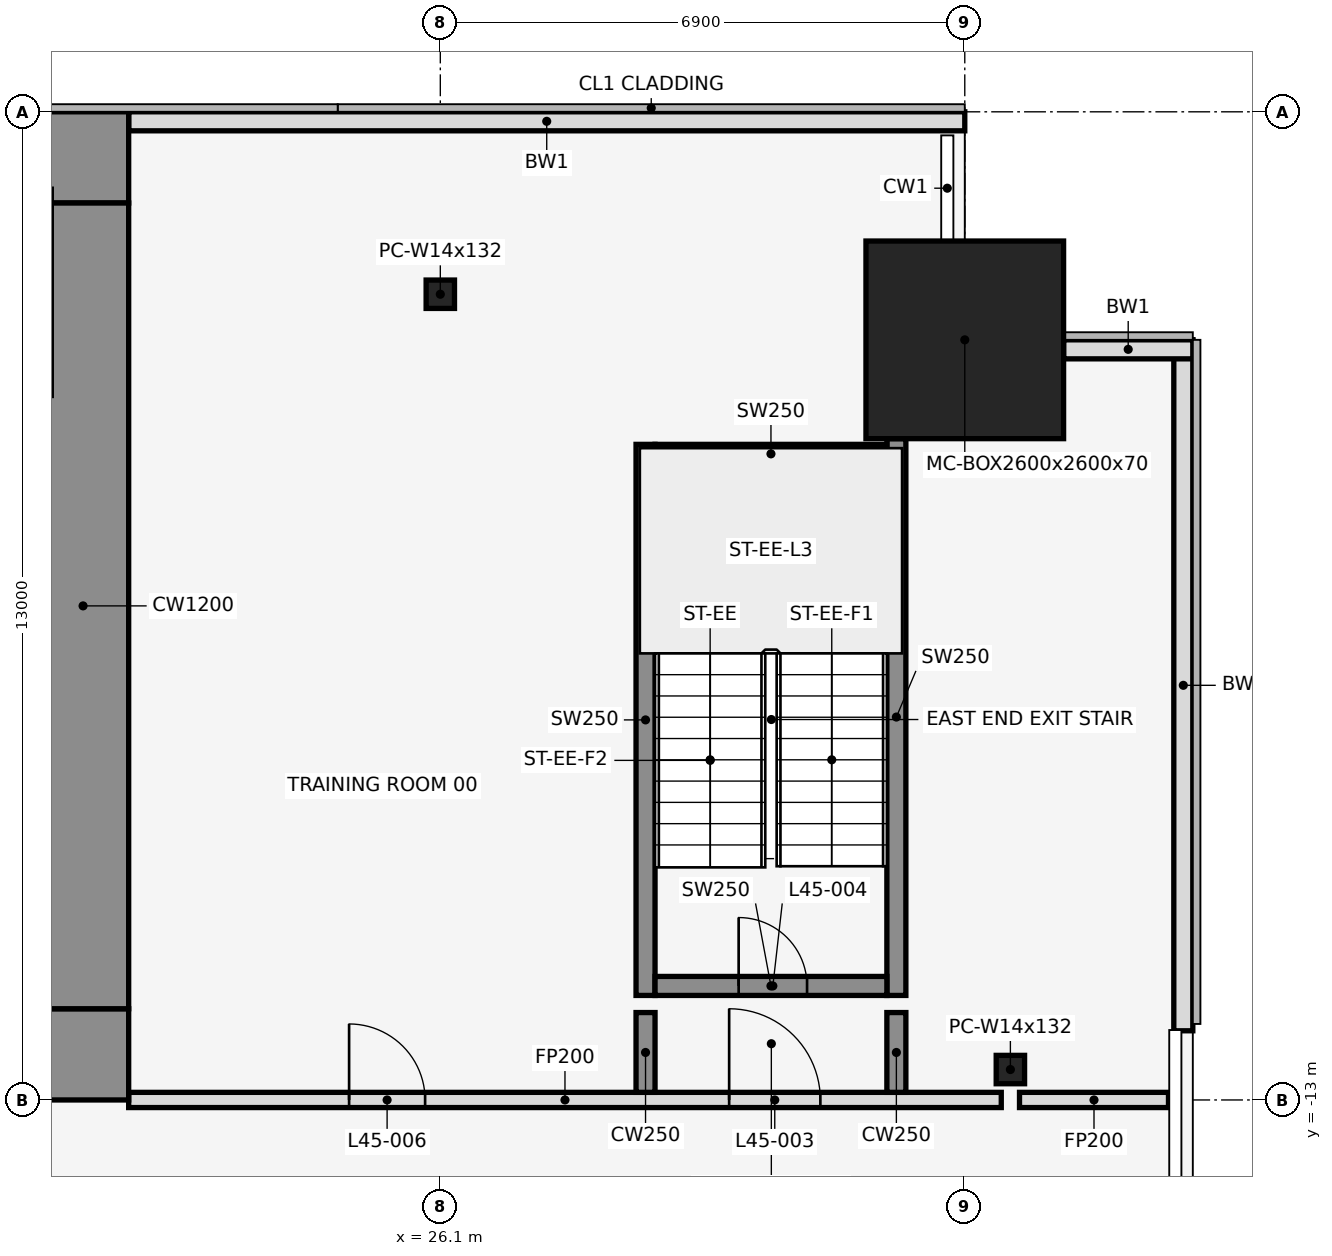
"""IFC4 building model, lengths in metres.
Left out: names, types, materials, properties, quantities, classifications, styles, units other than length and angle.
Written with IfcOpenShell. Run it as: python <this file> out.ifc"""

import sys

from ifc_helpers import new_model, si_unit, direction, frame, frame_2d, origin, origin_2d, place, context, subcontext, project, spatial, rectangle, hollow_rectangle, i_section, extrude, element, fill, save


model = new_model("IFC4")
c1 = context("Model", 3, precision=1e-05, world=origin(), true_north=direction((0.0, 1.0)))
c2 = subcontext(c1, "Body", "Model", "MODEL_VIEW")
j1 = project(units=[si_unit("LENGTHUNIT", "METRE"), si_unit("PLANEANGLEUNIT", "RADIAN")], contexts=[c1])
p1 = place(None, origin())
s1 = spatial("IfcSite", under=j1, at=p1, CompositionType="ELEMENT")
p2 = place(p1, origin())
s2 = spatial("IfcBuilding", under=s1, at=p2, CompositionType="ELEMENT")
p3 = place(p2, frame((0.0, 0.0, 203.2)))
s3 = spatial("IfcBuildingStorey", under=s2, at=p3, CompositionType="ELEMENT", Elevation=203.2)
p4 = place(p3, frame((26.1, -2.4, 0.0), z_axis=(0.0, 0.0, 1.0), x_axis=(1.0, 0.0, 0.0)))
e1 = element("IfcColumn", 1, at=p4, inside=s3, PredefinedType="COLUMN", context=c2, shape_type="SweptSolid", body=[
    extrude(i_section(OverallWidth=0.373, OverallDepth=0.373, WebThickness=0.016, FlangeThickness=0.026, at=origin_2d()), origin(), (0.0, 0.0, 1.0), 4.1),
])
p5 = place(p3, frame((33.0, -3.0, 0.0), z_axis=(0.0, 0.0, 1.0), x_axis=(1.0, 0.0, 0.0)))
e2 = element("IfcColumn", 2, at=p5, inside=s3, PredefinedType="COLUMN", context=c2, shape_type="SweptSolid", body=[
    extrude(hollow_rectangle(XDim=2.6, YDim=2.6, WallThickness=0.07, at=origin_2d()), origin(), (0.0, 0.0, 1.0), 4.1),
])
p6 = place(p3, frame((33.6, -12.6, 0.0), z_axis=(0.0, 0.0, 1.0), x_axis=(1.0, 0.0, 0.0)))
e3 = element("IfcColumn", 3, at=p6, inside=s3, PredefinedType="COLUMN", context=c2, shape_type="SweptSolid", body=[
    extrude(i_section(OverallWidth=0.373, OverallDepth=0.373, WebThickness=0.016, FlangeThickness=0.026, at=origin_2d()), origin(), (0.0, 0.0, 1.0), 4.1),
])
p7 = place(p3, frame((33.0, -0.125, 0.0), z_axis=(0.0, 0.0, 1.0), x_axis=(-1.0, 0.0, 0.0)))
e4 = element("IfcWall", 4, at=p7, inside=s3, PredefinedType="STANDARD", context=c2, shape_type="SweptSolid", body=[
    extrude(rectangle(XDim=11.0, YDim=0.25, at=frame_2d((5.5, 0.0))), origin(), (0.0, 0.0, 1.0), 3.95),
])
p8 = place(p3, frame((35.875, -12.09, 0.0), z_axis=(0.0, 0.0, 1.0), x_axis=(0.0, 1.0, 0.0)))
e5 = element("IfcWall", 5, at=p8, inside=s3, PredefinedType="STANDARD", context=c2, shape_type="SweptSolid", body=[
    extrude(rectangle(XDim=9.09, YDim=0.25, at=frame_2d((4.545, 0.0))), origin(), (0.0, 0.0, 1.0), 3.95),
])
p9 = place(p3, frame((36.0, -3.125, 0.0), z_axis=(0.0, 0.0, 1.0), x_axis=(-1.0, 0.0, 0.0)))
e6 = element("IfcWall", 6, at=p9, inside=s3, PredefinedType="STANDARD", context=c2, shape_type="SweptSolid", body=[
    extrude(rectangle(XDim=1.7, YDim=0.25, at=frame_2d((0.85, 0.0))), origin(), (0.0, 0.0, 1.0), 3.95),
])
p10 = place(p3, frame((28.8, -11.625, 0.0), z_axis=(0.0, 0.0, 1.0), x_axis=(0.0, 1.0, 0.0)))
e7 = element("IfcWall", 7, at=p10, inside=s3, PredefinedType="SHEAR", context=c2, shape_type="SweptSolid", body=[
    extrude(rectangle(XDim=7.25, YDim=0.25, at=frame_2d((3.625, 0.0))), origin(), (0.0, 0.0, 1.0), 4.1),
])
p11 = place(p3, frame((32.1, -11.625, 0.0), z_axis=(0.0, 0.0, 1.0), x_axis=(0.0, 1.0, 0.0)))
e8 = element("IfcWall", 8, at=p11, inside=s3, PredefinedType="SHEAR", context=c2, shape_type="SweptSolid", body=[
    extrude(rectangle(XDim=7.325, YDim=0.25, at=frame_2d((3.663, 0.0))), origin(), (0.0, 0.0, 1.0), 4.1),
])
p12 = place(p3, frame((28.925, -11.5, 0.0), z_axis=(0.0, 0.0, 1.0), x_axis=(1.0, 0.0, 0.0)))
e9 = element("IfcWall", 9, at=p12, inside=s3, PredefinedType="SHEAR", context=c2, shape_type="SweptSolid", body=[
    extrude(rectangle(XDim=3.05, YDim=0.25, at=frame_2d((1.525, 0.0))), origin(), (0.0, 0.0, 1.0), 4.1),
])
p13 = place(p12, frame((1.1, 0.0, 0.0)))
e10 = element("IfcOpeningElement", 10, at=p13, cuts=e9, PredefinedType="OPENING", context=c2, shape_type="SweptSolid", body=[
    extrude(rectangle(XDim=0.9, YDim=2.1, at=frame_2d((0.45, 1.05))), frame((0.0, 0.137, 0.0), z_axis=(0.0, -1.0, 0.0), x_axis=(1.0, 0.0, 0.0)), (0.0, 0.0, 1.0), 0.274),
])
p14 = place(p3, frame((28.925, -4.5, 0.0), z_axis=(0.0, 0.0, 1.0), x_axis=(1.0, 0.0, 0.0)))
e11 = element("IfcWall", 11, at=p14, inside=s3, PredefinedType="SHEAR", context=c2, shape_type="SweptSolid", body=[
    extrude(rectangle(XDim=3.05, YDim=0.25, at=frame_2d((1.525, 0.0))), origin(), (0.0, 0.0, 1.0), 4.1),
])
p15 = place(p3, frame((22.0, -13.0, 0.0), z_axis=(0.0, 0.0, 1.0), x_axis=(1.0, 0.0, 0.0)))
e12 = element("IfcWall", 12, at=p15, inside=s3, PredefinedType="PARTITIONING", context=c2, shape_type="SweptSolid", body=[
    extrude(rectangle(XDim=11.48, YDim=0.2, at=frame_2d((5.74, 0.0))), origin(), (0.0, 0.0, 1.0), 2.84),
])
p16 = place(p15, frame((7.9, 0.0, 0.0)))
e13 = element("IfcOpeningElement", 13, at=p16, cuts=e12, PredefinedType="OPENING", context=c2, shape_type="SweptSolid", body=[
    extrude(rectangle(XDim=1.2, YDim=2.1, at=frame_2d((0.6, 1.05))), frame((0.0, 0.112, 0.0), z_axis=(0.0, -1.0, 0.0), x_axis=(1.0, 0.0, 0.0)), (0.0, 0.0, 1.0), 0.224),
])
p17 = place(p15, frame((2.9, 0.0, 0.0)))
e14 = element("IfcOpeningElement", 14, at=p17, cuts=e12, PredefinedType="OPENING", context=c2, shape_type="SweptSolid", body=[
    extrude(rectangle(XDim=1.0, YDim=2.1, at=frame_2d((0.5, 1.05))), frame((0.0, 0.112, 0.0), z_axis=(0.0, -1.0, 0.0), x_axis=(1.0, 0.0, 0.0)), (0.0, 0.0, 1.0), 0.224),
])
p18 = place(p3, frame((33.72, -13.0, 0.0), z_axis=(0.0, 0.0, 1.0), x_axis=(1.0, 0.0, 0.0)))
e15 = element("IfcWall", 15, at=p18, inside=s3, PredefinedType="PARTITIONING", context=c2, shape_type="SweptSolid", body=[
    extrude(rectangle(XDim=1.96, YDim=0.2, at=frame_2d((0.98, 0.0))), origin(), (0.0, 0.0, 1.0), 2.84),
])
for number, where, z_axis, x_axis in (
    (16, (28.8, -12.9, 0.0), (0.0, 0.0, 1.0), (0.0, 1.0, 0.0)),
    (17, (32.1, -12.9, 0.0), (0.0, 0.0, 1.0), (0.0, 1.0, 0.0)),
):
    element("IfcWall", number, at=place(p3, frame(where, z_axis=z_axis, x_axis=x_axis)), inside=s3, PredefinedType="SHEAR", context=c2, shape_type="SweptSolid", body=[
        extrude(rectangle(XDim=1.05, YDim=0.25, at=frame_2d((0.525, 0.0))), origin(), (0.0, 0.0, 1.0), 4.1),
    ])
p19 = place(p3, frame((-22.0, -0.6, 0.0), z_axis=(0.0, 0.0, 1.0), x_axis=(1.0, 0.0, 0.0)))
e18 = element("IfcWall", 18, at=p19, inside=s3, PredefinedType="SHEAR", context=c2, shape_type="SweptSolid", body=[
    extrude(rectangle(XDim=44.0, YDim=1.2, at=frame_2d((22.0, 0.0))), origin(), (0.0, 0.0, 1.0), 4.1),
])
p20 = place(p19, frame((18.55, 0.0, 0.0)))
e19 = element("IfcOpeningElement", 19, at=p20, cuts=e18, PredefinedType="OPENING", context=c2, shape_type="SweptSolid", body=[
    extrude(rectangle(XDim=0.9, YDim=2.1, at=frame_2d((0.45, 1.05))), frame((0.0, 0.612, 0.0), z_axis=(0.0, -1.0, 0.0), x_axis=(1.0, 0.0, 0.0)), (0.0, 0.0, 1.0), 1.224),
])
p21 = place(p19, frame((24.55, 0.0, 0.0)))
e20 = element("IfcOpeningElement", 20, at=p21, cuts=e18, PredefinedType="OPENING", context=c2, shape_type="SweptSolid", body=[
    extrude(rectangle(XDim=0.9, YDim=2.1, at=frame_2d((0.45, 1.05))), frame((0.0, 0.612, 0.0), z_axis=(0.0, -1.0, 0.0), x_axis=(1.0, 0.0, 0.0)), (0.0, 0.0, 1.0), 1.224),
])
p22 = place(p3, frame((-22.0, -12.4, 0.0), z_axis=(0.0, 0.0, 1.0), x_axis=(1.0, 0.0, 0.0)))
e21 = element("IfcWall", 21, at=p22, inside=s3, PredefinedType="SHEAR", context=c2, shape_type="SweptSolid", body=[
    extrude(rectangle(XDim=44.0, YDim=1.2, at=frame_2d((22.0, 0.0))), origin(), (0.0, 0.0, 1.0), 4.1),
])
p23 = place(p22, frame((2.2, 0.0, 0.0)))
e22 = element("IfcOpeningElement", 22, at=p23, cuts=e21, PredefinedType="OPENING", context=c2, shape_type="SweptSolid", body=[
    extrude(rectangle(XDim=1.2, YDim=2.1, at=frame_2d((0.6, 1.05))), frame((0.0, 0.612, 0.0), z_axis=(0.0, -1.0, 0.0), x_axis=(1.0, 0.0, 0.0)), (0.0, 0.0, 1.0), 1.224),
])
p24 = place(p22, frame((21.4, 0.0, 0.0)))
e23 = element("IfcOpeningElement", 23, at=p24, cuts=e21, PredefinedType="OPENING", context=c2, shape_type="SweptSolid", body=[
    extrude(rectangle(XDim=1.2, YDim=2.1, at=frame_2d((0.6, 1.05))), frame((0.0, 0.612, 0.0), z_axis=(0.0, -1.0, 0.0), x_axis=(1.0, 0.0, 0.0)), (0.0, 0.0, 1.0), 1.224),
])
p25 = place(p22, frame((40.6, 0.0, 0.0)))
e24 = element("IfcOpeningElement", 24, at=p25, cuts=e21, PredefinedType="OPENING", context=c2, shape_type="SweptSolid", body=[
    extrude(rectangle(XDim=1.2, YDim=2.1, at=frame_2d((0.6, 1.05))), frame((0.0, 0.612, 0.0), z_axis=(0.0, -1.0, 0.0), x_axis=(1.0, 0.0, 0.0)), (0.0, 0.0, 1.0), 1.224),
])
p26 = place(p22, frame((16.0, 0.0, 0.0)))
e25 = element("IfcOpeningElement", 25, at=p26, cuts=e21, PredefinedType="OPENING", context=c2, shape_type="SweptSolid", body=[
    extrude(rectangle(XDim=1.8, YDim=2.1, at=frame_2d((0.9, 1.05))), frame((0.0, 0.612, 0.0), z_axis=(0.0, -1.0, 0.0), x_axis=(1.0, 0.0, 0.0)), (0.0, 0.0, 1.0), 1.224),
])
p27 = place(p22, frame((6.3, 0.0, 0.0)))
e26 = element("IfcOpeningElement", 26, at=p27, cuts=e21, PredefinedType="OPENING", context=c2, shape_type="SweptSolid", body=[
    extrude(rectangle(XDim=1.2, YDim=2.1, at=frame_2d((0.6, 1.05))), frame((0.0, 0.612, 0.0), z_axis=(0.0, -1.0, 0.0), x_axis=(1.0, 0.0, 0.0)), (0.0, 0.0, 1.0), 1.224),
])
p28 = place(p22, frame((26.2, 0.0, 0.0)))
e27 = element("IfcOpeningElement", 27, at=p28, cuts=e21, PredefinedType="OPENING", context=c2, shape_type="SweptSolid", body=[
    extrude(rectangle(XDim=1.8, YDim=2.1, at=frame_2d((0.9, 1.05))), frame((0.0, 0.612, 0.0), z_axis=(0.0, -1.0, 0.0), x_axis=(1.0, 0.0, 0.0)), (0.0, 0.0, 1.0), 1.224),
])
p29 = place(p22, frame((36.5, 0.0, 0.0)))
e28 = element("IfcOpeningElement", 28, at=p29, cuts=e21, PredefinedType="OPENING", context=c2, shape_type="SweptSolid", body=[
    extrude(rectangle(XDim=1.2, YDim=2.1, at=frame_2d((0.6, 1.05))), frame((0.0, 0.612, 0.0), z_axis=(0.0, -1.0, 0.0), x_axis=(1.0, 0.0, 0.0)), (0.0, 0.0, 1.0), 1.224),
])
p30 = place(p3, frame((21.4, -11.8, 0.0), z_axis=(0.0, 0.0, 1.0), x_axis=(0.0, 1.0, 0.0)))
e29 = element("IfcWall", 29, at=p30, inside=s3, PredefinedType="SHEAR", context=c2, shape_type="SweptSolid", body=[
    extrude(rectangle(XDim=10.6, YDim=1.2, at=frame_2d((5.3, 0.0))), origin(), (0.0, 0.0, 1.0), 4.1),
])
p31 = place(p16, origin())
e30 = element("IfcDoor", 30, at=p31, inside=s3, OperationType="SINGLE_SWING_RIGHT", PredefinedType="DOOR", context=c2, shape_type="SweptSolid", body=[
    extrude(rectangle(XDim=1.2, YDim=2.1, at=frame_2d((0.6, 1.05))), frame((0.0, 0.025, 0.0), z_axis=(0.0, -1.0, 0.0), x_axis=(1.0, 0.0, 0.0)), (0.0, 0.0, 1.0), 0.05),
])
fill(e13, e30)
p32 = place(p13, origin())
e31 = element("IfcDoor", 31, at=p32, inside=s3, OperationType="SINGLE_SWING_LEFT", PredefinedType="DOOR", context=c2, shape_type="SweptSolid", body=[
    extrude(rectangle(XDim=0.9, YDim=2.1, at=frame_2d((0.45, 1.05))), frame((0.0, 0.025, 0.0), z_axis=(0.0, -1.0, 0.0), x_axis=(1.0, 0.0, 0.0)), (0.0, 0.0, 1.0), 0.05),
])
fill(e10, e31)
p33 = place(p17, origin())
e32 = element("IfcDoor", 32, at=p33, inside=s3, OperationType="SINGLE_SWING_RIGHT", PredefinedType="DOOR", context=c2, shape_type="SweptSolid", body=[
    extrude(rectangle(XDim=1.0, YDim=2.1, at=frame_2d((0.5, 1.05))), frame((0.0, 0.025, 0.0), z_axis=(0.0, -1.0, 0.0), x_axis=(1.0, 0.0, 0.0)), (0.0, 0.0, 1.0), 0.05),
])
fill(e14, e32)
save(model, sys.argv[1])
